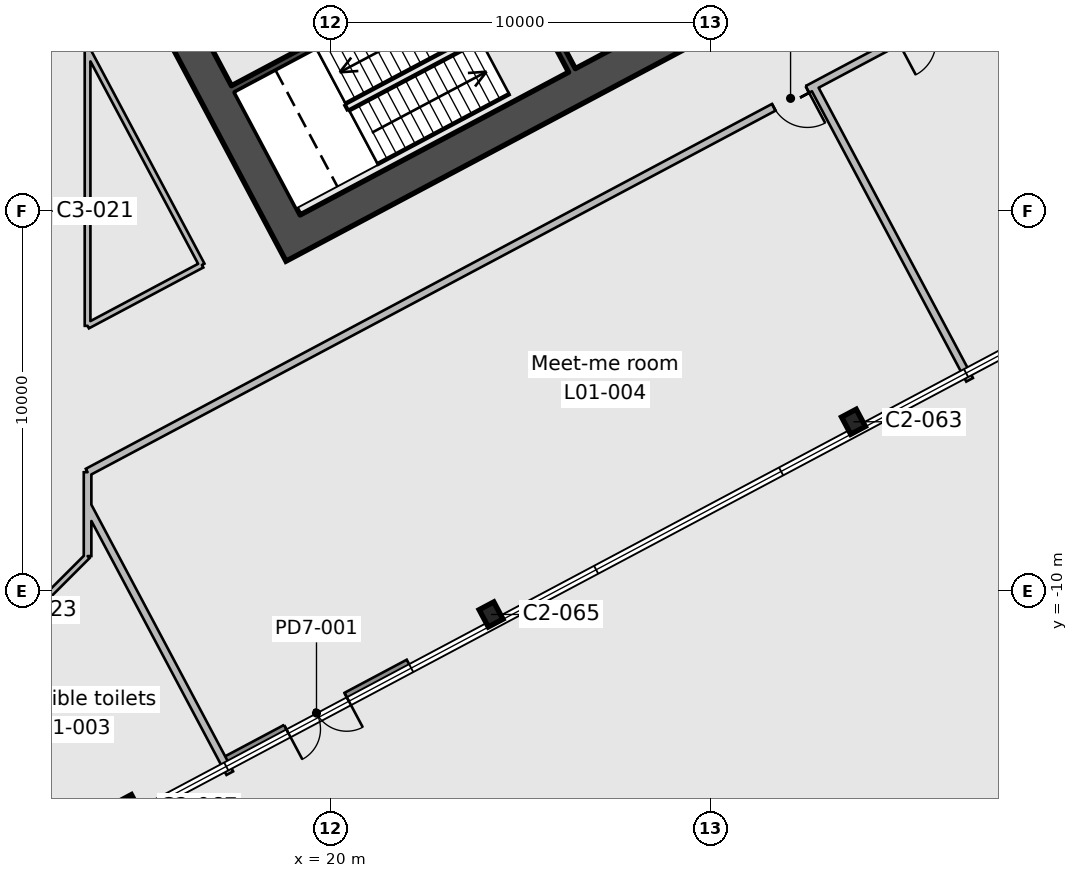
"""IFC4 building model, lengths in metres.
Left out: names, types, materials, properties, quantities, classifications, styles, units other than length and angle.
Written with IfcOpenShell. Run it as: python <this file> out.ifc"""

import sys

from ifc_helpers import new_model, si_unit, direction, frame, frame_2d, origin, origin_2d, place, context, subcontext, project, spatial, rectangle, i_section, extrude, element, fill, save


model = new_model("IFC4")
c1 = context("Model", 3, precision=1e-05, world=origin(), true_north=direction((0.0, 1.0)))
c2 = subcontext(c1, "Body", "Model", "MODEL_VIEW")
j1 = project(units=[si_unit("LENGTHUNIT", "METRE"), si_unit("PLANEANGLEUNIT", "RADIAN")], contexts=[c1])
p1 = place(None, origin())
s1 = spatial("IfcSite", under=j1, at=p1, CompositionType="ELEMENT")
p2 = place(p1, origin())
s2 = spatial("IfcBuilding", under=s1, at=p2, CompositionType="ELEMENT")
p3 = place(p2, frame((0.0, 0.0, 7.0)))
s3 = spatial("IfcBuildingStorey", under=s2, at=p3, CompositionType="ELEMENT", Elevation=7.0)
for number, where, z_axis, x_axis in (
    (1, (14.681, -15.683, 0.0), (0.0, 0.0, 1.0), (0.883, 0.469, 0.0)),
    (2, (24.217, -10.613, 0.0), (0.0, 0.0, 1.0), (0.883, 0.469, 0.0)),
    (3, (33.753, -5.543, 0.0), (0.0, 0.0, 1.0), (0.883, 0.469, 0.0)),
):
    element("IfcColumn", number, at=place(p3, frame(where, z_axis=z_axis, x_axis=x_axis)), inside=s3, PredefinedType="COLUMN", context=c2, shape_type="SweptSolid", body=[
        extrude(i_section(OverallWidth=0.437, OverallDepth=0.513, WebThickness=0.061, FlangeThickness=0.097, FilletRadius=0.015, at=origin_2d()), origin(), (0.0, 0.0, 1.0), 5.2),
    ])
p4 = place(p3, frame((19.219, -1.107, 0.0), z_axis=(0.0, 0.0, 1.0), x_axis=(-0.46947084998, 0.882947971864, 0.0)))
e4 = element("IfcWall", 4, at=p4, inside=s3, PredefinedType="SHEAR", context=c2, shape_type="SweptSolid", body=[
    extrude(rectangle(XDim=20.0, YDim=0.9, at=frame_2d((10.0, 0.0))), origin(), (0.0, 0.0, 1.0), 5.2),
])
p5 = place(p4, frame((7.0, 0.0, 0.0)))
e5 = element("IfcOpeningElement", 5, at=p5, cuts=e4, PredefinedType="OPENING", context=c2, shape_type="SweptSolid", body=[
    extrude(rectangle(XDim=2.4, YDim=2.4, at=frame_2d((1.2, 1.2))), frame((0.0, 0.46, 0.0), z_axis=(0.0, -1.0, 0.0), x_axis=(1.0, 0.0, 0.0)), (0.0, 0.0, 1.0), 0.92),
])
p6 = place(p3, frame((19.405, -0.498, 0.0), z_axis=(0.0, 0.0, 1.0), x_axis=(0.88294509198, 0.469476266226, 0.0)))
e6 = element("IfcWall", 6, at=p6, inside=s3, PredefinedType="SHEAR", context=c2, shape_type="SweptSolid", body=[
    extrude(rectangle(XDim=20.2, YDim=0.9, at=frame_2d((10.1, 0.0))), origin(), (0.0, 0.0, 1.0), 5.2),
])
p7 = place(p3, frame((26.346, 3.702, 0.0), z_axis=(0.0, 0.0, 1.0), x_axis=(-0.469480409012, 0.88294288918, 0.0)))
e7 = element("IfcWall", 7, at=p7, inside=s3, PredefinedType="SHEAR", context=c2, shape_type="SweptSolid", body=[
    extrude(rectangle(XDim=7.3, YDim=0.2, at=frame_2d((3.65, 0.0))), origin(), (0.0, 0.0, 1.0), 5.2),
])
p8 = place(p7, frame((1.3, 0.0, 0.0)))
e8 = element("IfcOpeningElement", 8, at=p8, cuts=e7, PredefinedType="OPENING", context=c2, shape_type="SweptSolid", body=[
    extrude(rectangle(XDim=1.2, YDim=2.1, at=frame_2d((0.6, 1.05))), frame((0.0, 0.11, 0.0), z_axis=(0.0, -1.0, 0.0), x_axis=(1.0, 0.0, 0.0)), (0.0, 0.0, 1.0), 0.22),
])
p9 = place(p3, frame((17.434, 3.21, 0.0), z_axis=(0.0, 0.0, 1.0), x_axis=(0.882940221191, 0.469485426614, 0.0)))
e9 = element("IfcWall", 9, at=p9, inside=s3, PredefinedType="SHEAR", context=c2, shape_type="SweptSolid", body=[
    extrude(rectangle(XDim=8.0, YDim=0.2, at=frame_2d((4.0, 0.0))), origin(), (0.0, 0.0, 1.0), 5.2),
])
p10 = place(p3, frame((17.19, -14.502, 0.0), z_axis=(0.0, 0.0, 1.0), x_axis=(0.88294935199, 0.469468254326, 0.0)))
e10 = element("IfcWall", 10, at=p10, inside=s3, PredefinedType="STANDARD", context=c2, shape_type="SweptSolid", body=[
    extrude(rectangle(XDim=5.512, YDim=0.25, at=frame_2d((2.756, 0.0))), origin(), (0.0, 0.0, 1.0), 3.612),
])
p11 = place(p10, frame((1.856, 0.0, 0.0)))
e11 = element("IfcOpeningElement", 11, at=p11, cuts=e10, PredefinedType="OPENING", context=c2, shape_type="SweptSolid", body=[
    extrude(rectangle(XDim=1.8, YDim=2.4, at=frame_2d((0.9, 1.2))), frame((0.0, 0.135, 0.0), z_axis=(0.0, -1.0, 0.0), x_axis=(1.0, 0.0, 0.0)), (0.0, 0.0, 1.0), 0.27),
])
p12 = place(p3, frame((13.6, -7.756, 0.0), z_axis=(0.0, 0.0, 1.0), x_axis=(0.0, -1.0, 0.0)))
e12 = element("IfcWall", 12, at=p12, inside=s3, PredefinedType="PARTITIONING", context=c2, shape_type="SweptSolid", body=[
    extrude(rectangle(XDim=1.321, YDim=0.2, at=frame_2d((0.66, 0.0))), origin(), (0.0, 0.0, 1.0), 4.75),
])
p13 = place(p3, frame((13.6, -9.077, 0.0), z_axis=(0.0, 0.0, 1.0), x_axis=(-0.707106781187, -0.707106781187, 0.0)))
e13 = element("IfcWall", 13, at=p13, inside=s3, PredefinedType="PARTITIONING", context=c2, shape_type="SweptSolid", body=[
    extrude(rectangle(XDim=6.397, YDim=0.15, at=frame_2d((3.198, 0.0))), origin(), (0.0, 0.0, 1.0), 4.75),
])
p14 = place(p3, frame((13.6, -7.75, 0.0), z_axis=(0.0, 0.0, 1.0), x_axis=(0.469489555723, -0.882938025609, 0.0)))
e14 = element("IfcWall", 14, at=p14, inside=s3, PredefinedType="PARTITIONING", context=c2, shape_type="SweptSolid", body=[
    extrude(rectangle(XDim=7.972, YDim=0.2, at=frame_2d((3.986, 0.0))), origin(), (0.0, 0.0, 1.0), 4.75),
])
p15 = place(p3, frame((57.041, 16.229, 0.0), z_axis=(0.0, 0.0, 1.0), x_axis=(-0.882947975476, -0.469470843188, 0.0)))
e15 = element("IfcWall", 15, at=p15, inside=s3, PredefinedType="PARTITIONING", context=c2, shape_type="SweptSolid", body=[
    extrude(rectangle(XDim=49.2, YDim=0.2, at=frame_2d((24.6, 0.0))), origin(), (0.0, 0.0, 1.0), 4.75),
])
p16 = place(p15, frame((27.75, 0.0, 0.0)))
e16 = element("IfcOpeningElement", 16, at=p16, cuts=e15, PredefinedType="OPENING", context=c2, shape_type="SweptSolid", body=[
    extrude(rectangle(XDim=1.0, YDim=2.1, at=frame_2d((0.5, 1.05))), frame((0.0, 0.11, 0.0), z_axis=(0.0, -1.0, 0.0), x_axis=(1.0, 0.0, 0.0)), (0.0, 0.0, 1.0), 0.22),
])
p17 = place(p15, frame((24.05, 0.0, 0.0)))
e17 = element("IfcOpeningElement", 17, at=p17, cuts=e15, PredefinedType="OPENING", context=c2, shape_type="SweptSolid", body=[
    extrude(rectangle(XDim=1.0, YDim=2.1, at=frame_2d((0.5, 1.05))), frame((0.0, 0.11, 0.0), z_axis=(0.0, -1.0, 0.0), x_axis=(1.0, 0.0, 0.0)), (0.0, 0.0, 1.0), 0.22),
])
p18 = place(p15, frame((15.35, 0.0, 0.0)))
e18 = element("IfcOpeningElement", 18, at=p18, cuts=e15, PredefinedType="OPENING", context=c2, shape_type="SweptSolid", body=[
    extrude(rectangle(XDim=1.0, YDim=2.1, at=frame_2d((0.5, 1.05))), frame((0.0, 0.11, 0.0), z_axis=(0.0, -1.0, 0.0), x_axis=(1.0, 0.0, 0.0)), (0.0, 0.0, 1.0), 0.22),
])
p19 = place(p3, frame((13.6, -6.869, 0.0), z_axis=(0.0, 0.0, 1.0), x_axis=(0.0, -1.0, 0.0)))
e19 = element("IfcWall", 19, at=p19, inside=s3, PredefinedType="PARTITIONING", context=c2, shape_type="SweptSolid", body=[
    extrude(rectangle(XDim=0.887, YDim=0.2, at=frame_2d((0.444, 0.0))), origin(), (0.0, 0.0, 1.0), 4.75),
])
p20 = place(p3, frame((36.809, -4.439, 0.0), z_axis=(0.0, 0.0, 1.0), x_axis=(-0.469482945701, 0.882941540361, 0.0)))
e20 = element("IfcWall", 20, at=p20, inside=s3, PredefinedType="PARTITIONING", context=c2, shape_type="SweptSolid", body=[
    extrude(rectangle(XDim=8.75, YDim=0.2, at=frame_2d((4.375, 0.0))), origin(), (0.0, 0.0, 1.0), 4.75),
])
p21 = place(p3, frame((13.6, 4.243, 0.0), z_axis=(0.0, 0.0, 1.0), x_axis=(0.0, -1.0, 0.0)))
e21 = element("IfcWall", 21, at=p21, inside=s3, PredefinedType="PARTITIONING", context=c2, shape_type="SweptSolid", body=[
    extrude(rectangle(XDim=7.262, YDim=0.15, at=frame_2d((3.631, 0.0))), origin(), (0.0, 0.0, 1.0), 4.75),
])
p22 = place(p3, frame((13.6, -3.019, 0.0), z_axis=(0.0, 0.0, 1.0), x_axis=(0.8828717575, 0.469614160571, 0.0)))
e22 = element("IfcWall", 22, at=p22, inside=s3, PredefinedType="PARTITIONING", context=c2, shape_type="SweptSolid", body=[
    extrude(rectangle(XDim=3.409, YDim=0.15, at=frame_2d((1.705, 0.0))), origin(), (0.0, 0.0, 1.0), 4.75),
])
p23 = place(p3, frame((16.61, -1.418, 0.0), z_axis=(0.0, 0.0, 1.0), x_axis=(-0.469479085554, 0.882943592891, 0.0)))
e23 = element("IfcWall", 23, at=p23, inside=s3, PredefinedType="PARTITIONING", context=c2, shape_type="SweptSolid", body=[
    extrude(rectangle(XDim=6.411, YDim=0.15, at=frame_2d((3.206, 0.0))), origin(), (0.0, 0.0, 1.0), 4.75),
])
p24 = place(p11, frame((1.8, 0.0, 0.0), z_axis=(0.0, 0.0, 1.0), x_axis=(-1.0, 0.0, 0.0)))
e24 = element("IfcDoor", 24, at=p24, inside=s3, OperationType="DOUBLE_DOOR_SINGLE_SWING", PredefinedType="DOOR", context=c2, shape_type="SweptSolid", body=[
    extrude(rectangle(XDim=1.8, YDim=2.4, at=frame_2d((0.9, 1.2))), frame((0.0, 0.025, 0.0), z_axis=(0.0, -1.0, 0.0), x_axis=(1.0, 0.0, 0.0)), (0.0, 0.0, 1.0), 0.05),
])
fill(e11, e24)
p25 = place(p16, origin())
e25 = element("IfcDoor", 25, at=p25, inside=s3, OperationType="SINGLE_SWING_LEFT", PredefinedType="DOOR", context=c2, shape_type="SweptSolid", body=[
    extrude(rectangle(XDim=1.0, YDim=2.1, at=frame_2d((0.5, 1.05))), frame((0.0, 0.025, 0.0), z_axis=(0.0, -1.0, 0.0), x_axis=(1.0, 0.0, 0.0)), (0.0, 0.0, 1.0), 0.05),
])
fill(e16, e25)
save(model, sys.argv[1])
